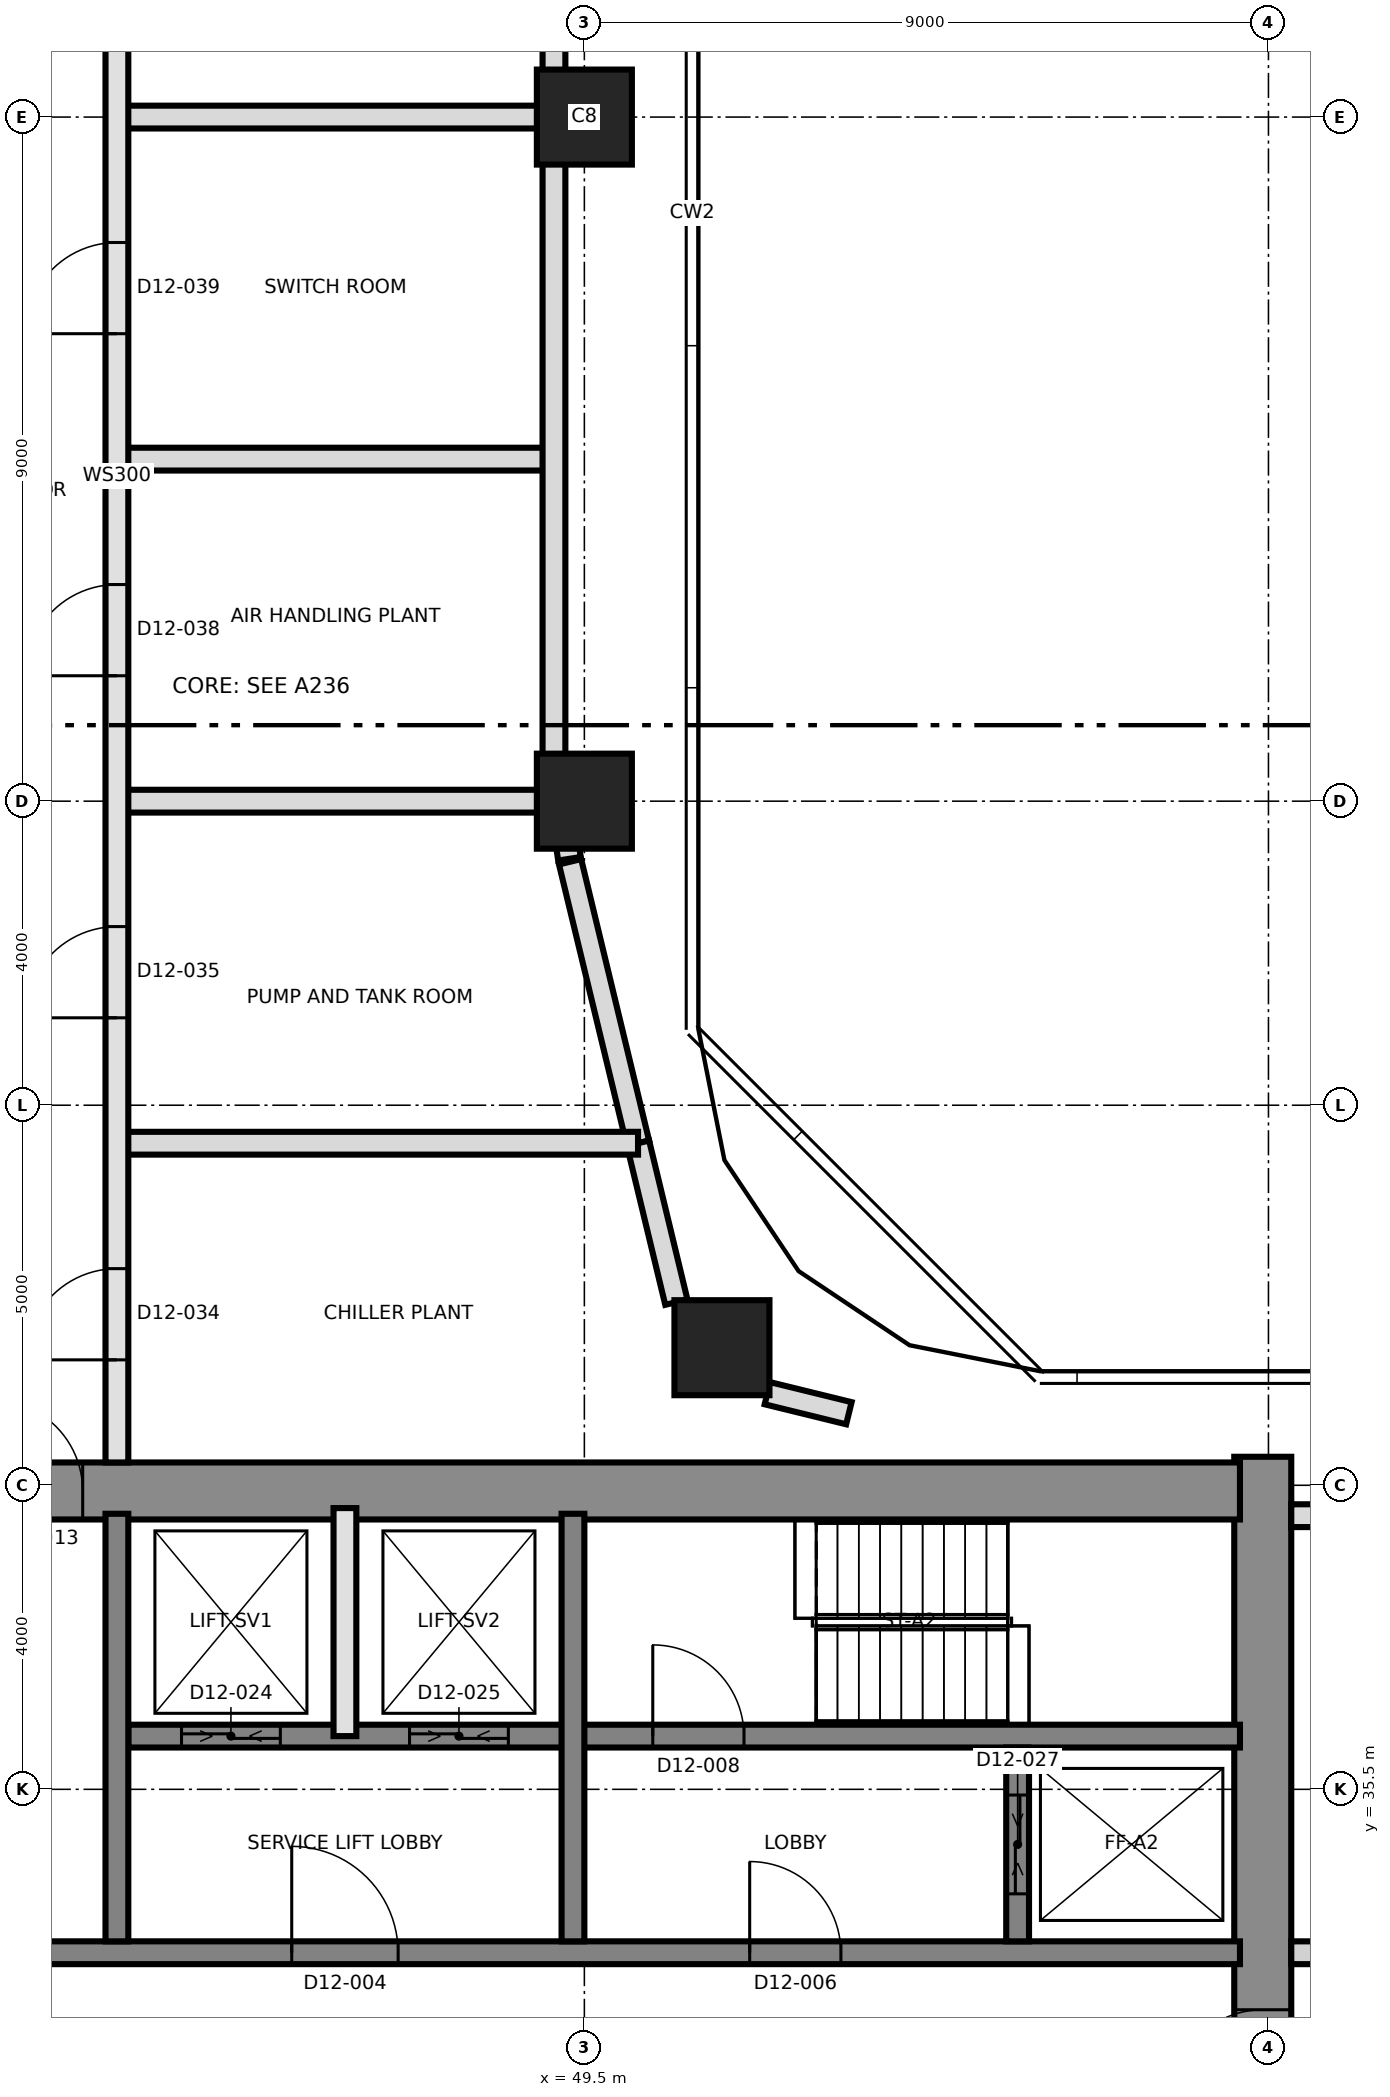
"""IFC4 building model, lengths in metres.
Left out: names, types, materials, properties, quantities, classifications, styles, units other than length and angle.
Written with IfcOpenShell. Run it as: python <this file> out.ifc"""

import sys

from ifc_helpers import new_model, si_unit, direction, frame, frame_2d, origin, origin_2d, place, context, subcontext, project, spatial, rectangle, extrude, element, fill, save


model = new_model("IFC4")
c1 = context("Model", 3, precision=1e-05, world=origin(), true_north=direction((0.0, 1.0)))
c2 = subcontext(c1, "Body", "Model", "MODEL_VIEW")
j1 = project(units=[si_unit("LENGTHUNIT", "METRE"), si_unit("PLANEANGLEUNIT", "RADIAN")], contexts=[c1])
p1 = place(None, origin())
s1 = spatial("IfcSite", under=j1, at=p1, CompositionType="ELEMENT")
p2 = place(p1, origin())
s2 = spatial("IfcBuilding", under=s1, at=p2, CompositionType="ELEMENT")
p3 = place(p2, frame((0.0, 0.0, 135.2)))
s3 = spatial("IfcBuildingStorey", under=s2, at=p3, CompositionType="ELEMENT", Elevation=135.2)
p4 = place(p3, frame((58.425, 21.125, 0.0), z_axis=(0.0, 0.0, 1.0), x_axis=(0.0, 1.0, 0.0)))
e1 = element("IfcWall", 1, at=p4, inside=s3, PredefinedType="SHEAR", context=c2, shape_type="SweptSolid", body=[
    extrude(rectangle(XDim=18.75, YDim=0.75, at=frame_2d((9.375, 0.0))), origin(), (0.0, 0.0, 1.0), 7.0),
])
p5 = place(p4, frame((10.275, 0.0, 0.0)))
e2 = element("IfcOpeningElement", 2, at=p5, cuts=e1, PredefinedType="OPENING", context=c2, shape_type="SweptSolid", body=[
    extrude(rectangle(XDim=1.2, YDim=2.1, at=frame_2d((0.6, 1.05))), frame((0.0, 0.385, 0.0), z_axis=(0.0, -1.0, 0.0), x_axis=(1.0, 0.0, 0.0)), (0.0, 0.0, 1.0), 0.77),
])
p6 = place(p3, frame((31.125, 39.425, 0.0), z_axis=(0.0, 0.0, 1.0), x_axis=(1.0, 0.0, 0.0)))
e3 = element("IfcWall", 3, at=p6, inside=s3, PredefinedType="SHEAR", context=c2, shape_type="SweptSolid", body=[
    extrude(rectangle(XDim=27.0, YDim=0.75, at=frame_2d((13.5, 0.0))), origin(), (0.0, 0.0, 1.0), 7.0),
])
p7 = place(p6, frame((10.575, 0.0, 0.0)))
e4 = element("IfcOpeningElement", 4, at=p7, cuts=e3, PredefinedType="OPENING", context=c2, shape_type="SweptSolid", body=[
    extrude(rectangle(XDim=1.2, YDim=2.1, at=frame_2d((0.6, 1.05))), frame((0.0, 0.385, 0.0), z_axis=(0.0, -1.0, 0.0), x_axis=(1.0, 0.0, 0.0)), (0.0, 0.0, 1.0), 0.77),
])
p8 = place(p3, frame((31.875, 33.35, 0.0), z_axis=(0.0, 0.0, 1.0), x_axis=(1.0, 0.0, 0.0)))
e5 = element("IfcWall", 5, at=p8, inside=s3, PredefinedType="SHEAR", context=c2, shape_type="SweptSolid", body=[
    extrude(rectangle(XDim=26.25, YDim=0.3, at=frame_2d((13.125, 0.0))), origin(), (0.0, 0.0, 1.0), 7.0),
])
p9 = place(p8, frame((13.775, 0.0, 0.0)))
e6 = element("IfcOpeningElement", 6, at=p9, cuts=e5, PredefinedType="OPENING", context=c2, shape_type="SweptSolid", body=[
    extrude(rectangle(XDim=1.4, YDim=2.1, at=frame_2d((0.7, 1.05))), frame((0.0, 0.16, 0.0), z_axis=(0.0, -1.0, 0.0), x_axis=(1.0, 0.0, 0.0)), (0.0, 0.0, 1.0), 0.32),
])
p10 = place(p8, frame((5.25, 0.0, 0.0)))
e7 = element("IfcOpeningElement", 7, at=p10, cuts=e5, PredefinedType="OPENING", context=c2, shape_type="SweptSolid", body=[
    extrude(rectangle(XDim=1.2, YDim=2.1, at=frame_2d((0.6, 1.05))), frame((0.0, 0.16, 0.0), z_axis=(0.0, -1.0, 0.0), x_axis=(1.0, 0.0, 0.0)), (0.0, 0.0, 1.0), 0.32),
])
p11 = place(p8, frame((19.8, 0.0, 0.0)))
e8 = element("IfcOpeningElement", 8, at=p11, cuts=e5, PredefinedType="OPENING", context=c2, shape_type="SweptSolid", body=[
    extrude(rectangle(XDim=1.2, YDim=2.1, at=frame_2d((0.6, 1.05))), frame((0.0, 0.16, 0.0), z_axis=(0.0, -1.0, 0.0), x_axis=(1.0, 0.0, 0.0)), (0.0, 0.0, 1.0), 0.32),
])
p12 = place(p3, frame((43.5, 36.2, 0.0), z_axis=(0.0, 0.0, 1.0), x_axis=(1.0, 0.0, 0.0)))
e9 = element("IfcWall", 9, at=p12, inside=s3, PredefinedType="SHEAR", context=c2, shape_type="SweptSolid", body=[
    extrude(rectangle(XDim=14.625, YDim=0.3, at=frame_2d((7.312, 0.0))), origin(), (0.0, 0.0, 1.0), 7.0),
])
p13 = place(p12, frame((6.9, 0.0, 0.0)))
e10 = element("IfcOpeningElement", 10, at=p13, cuts=e9, PredefinedType="OPENING", context=c2, shape_type="SweptSolid", body=[
    extrude(rectangle(XDim=1.2, YDim=2.1, at=frame_2d((0.6, 1.05))), frame((0.0, 0.16, 0.0), z_axis=(0.0, -1.0, 0.0), x_axis=(1.0, 0.0, 0.0)), (0.0, 0.0, 1.0), 0.32),
])
p14 = place(p12, frame((0.7, 0.0, 0.0)))
e11 = element("IfcOpeningElement", 11, at=p14, cuts=e9, PredefinedType="OPENING", context=c2, shape_type="SweptSolid", body=[
    extrude(rectangle(XDim=1.3, YDim=2.4, at=frame_2d((0.65, 1.2))), frame((0.0, 0.16, 0.0), z_axis=(0.0, -1.0, 0.0), x_axis=(1.0, 0.0, 0.0)), (0.0, 0.0, 1.0), 0.32),
])
p15 = place(p12, frame((3.7, 0.0, 0.0)))
e12 = element("IfcOpeningElement", 12, at=p15, cuts=e9, PredefinedType="OPENING", context=c2, shape_type="SweptSolid", body=[
    extrude(rectangle(XDim=1.3, YDim=2.4, at=frame_2d((0.65, 1.2))), frame((0.0, 0.16, 0.0), z_axis=(0.0, -1.0, 0.0), x_axis=(1.0, 0.0, 0.0)), (0.0, 0.0, 1.0), 0.32),
])
for number, where, z_axis, x_axis in (
    (13, (43.35, 33.5, 0.0), (0.0, 0.0, 1.0), (0.0, 1.0, 0.0)),
    (14, (49.35, 33.5, 0.0), (0.0, 0.0, 1.0), (0.0, 1.0, 0.0)),
):
    element("IfcWall", number, at=place(p3, frame(where, z_axis=z_axis, x_axis=x_axis)), inside=s3, PredefinedType="SHEAR", context=c2, shape_type="SweptSolid", body=[
        extrude(rectangle(XDim=5.625, YDim=0.3, at=frame_2d((2.812, 0.0))), origin(), (0.0, 0.0, 1.0), 7.0),
    ])
p16 = place(p3, frame((55.2, 33.5, 0.0), z_axis=(0.0, 0.0, 1.0), x_axis=(0.0, 1.0, 0.0)))
e15 = element("IfcWall", 15, at=p16, inside=s3, PredefinedType="SHEAR", context=c2, shape_type="SweptSolid", body=[
    extrude(rectangle(XDim=2.55, YDim=0.3, at=frame_2d((1.275, 0.0))), origin(), (0.0, 0.0, 1.0), 7.0),
])
p17 = place(p16, frame((0.625, 0.0, 0.0)))
e16 = element("IfcOpeningElement", 16, at=p17, cuts=e15, PredefinedType="OPENING", context=c2, shape_type="SweptSolid", body=[
    extrude(rectangle(XDim=1.3, YDim=2.4, at=frame_2d((0.65, 1.2))), frame((0.0, 0.16, 0.0), z_axis=(0.0, -1.0, 0.0), x_axis=(1.0, 0.0, 0.0)), (0.0, 0.0, 1.0), 0.32),
])
for number, where, z_axis, x_axis in (
    (17, (51.31, 41.31, 0.0), (0.0, 0.0, 1.0), (1.0, 0.0, 0.0)),
    (18, (49.5, 48.5, 0.0), (0.0, 0.0, 1.0), (1.0, 0.0, 0.0)),
    (19, (49.5, 57.5, 0.0), (0.0, 0.0, 1.0), (1.0, 0.0, 0.0)),
):
    element("IfcColumn", number, at=place(p3, frame(where, z_axis=z_axis, x_axis=x_axis)), inside=s3, PredefinedType="COLUMN", context=c2, shape_type="SweptSolid", body=[
        extrude(rectangle(XDim=1.25, YDim=1.25, at=origin_2d()), origin(), (0.0, 0.0, 1.0), 7.0),
    ])
p18 = place(p3, frame((46.35, 36.2, 0.0), z_axis=(0.0, 0.0, 1.0), x_axis=(0.0, 1.0, 0.0)))
e20 = element("IfcWall", 20, at=p18, inside=s3, PredefinedType="SOLIDWALL", context=c2, shape_type="SweptSolid", body=[
    extrude(rectangle(XDim=3.0, YDim=0.3, at=frame_2d((1.5, 0.0))), origin(), (0.0, 0.0, 1.0), 6.7),
])
p19 = place(p3, frame((49.1, 49.069, 0.0), z_axis=(0.0, 0.0, 1.0), x_axis=(0.152694606026, -0.988273422333, 0.0)))
e21 = element("IfcWall", 21, at=p19, inside=s3, PredefinedType="PARTITIONING", context=c2, shape_type="SweptSolid", body=[
    extrude(rectangle(XDim=0.403, YDim=0.3, at=frame_2d((0.201, 0.0))), origin(), (0.0, 0.0, 1.0), 6.7),
])
p20 = place(p3, frame((49.188, 48.5, 0.0), z_axis=(0.0, 0.0, 1.0), x_axis=(0.151219830962, -0.988500158181, 0.0)))
e22 = element("IfcWall", 22, at=p20, inside=s3, PredefinedType="PARTITIONING", context=c2, shape_type="SweptSolid", body=[
    extrude(rectangle(XDim=0.767, YDim=0.3, at=frame_2d((0.383, 0.0))), origin(), (0.0, 0.0, 1.0), 6.7),
])
p21 = place(p3, frame((49.312, 47.703, 0.0), z_axis=(0.0, 0.0, 1.0), x_axis=(0.234701095005, -0.972067588187, 0.0)))
e23 = element("IfcWall", 23, at=p21, inside=s3, PredefinedType="PARTITIONING", context=c2, shape_type="SweptSolid", body=[
    extrude(rectangle(XDim=3.809, YDim=0.3, at=frame_2d((1.905, 0.0))), origin(), (0.0, 0.0, 1.0), 6.7),
])
p22 = place(p3, frame((50.206, 44.0, 0.0), z_axis=(0.0, 0.0, 1.0), x_axis=(0.23427436711, -0.972170520493, 0.0)))
e24 = element("IfcWall", 24, at=p22, inside=s3, PredefinedType="PARTITIONING", context=c2, shape_type="SweptSolid", body=[
    extrude(rectangle(XDim=2.151, YDim=0.3, at=frame_2d((1.075, 0.0))), origin(), (0.0, 0.0, 1.0), 6.7),
])
p23 = place(p3, frame((50.82, 41.715, 0.0), z_axis=(0.0, 0.0, 1.0), x_axis=(0.707106781187, -0.707106781187, 0.0)))
e25 = element("IfcWall", 25, at=p23, inside=s3, PredefinedType="PARTITIONING", context=c2, shape_type="SweptSolid", body=[
    extrude(rectangle(XDim=1.266, YDim=0.3, at=frame_2d((0.633, 0.0))), origin(), (0.0, 0.0, 1.0), 6.7),
])
p24 = place(p3, frame((51.908, 40.711, 0.0), z_axis=(0.0, 0.0, 1.0), x_axis=(0.971212775143, -0.238213654937, 0.0)))
e26 = element("IfcWall", 26, at=p24, inside=s3, PredefinedType="PARTITIONING", context=c2, shape_type="SweptSolid", body=[
    extrude(rectangle(XDim=1.104, YDim=0.3, at=frame_2d((0.552, 0.0))), origin(), (0.0, 0.0, 1.0), 6.7),
])
p25 = place(p3, frame((58.8, 33.35, 0.0), z_axis=(0.0, 0.0, 1.0), x_axis=(1.0, 0.0, 0.0)))
e27 = element("IfcWall", 27, at=p25, inside=s3, PredefinedType="PARTITIONING", context=c2, shape_type="SweptSolid", body=[
    extrude(rectangle(XDim=26.53, YDim=0.3, at=frame_2d((13.265, 0.0))), origin(), (0.0, 0.0, 1.0), 6.7),
])
p26 = place(p25, frame((12.0, 0.0, 0.0)))
e28 = element("IfcOpeningElement", 28, at=p26, cuts=e27, PredefinedType="OPENING", context=c2, shape_type="SweptSolid", body=[
    extrude(rectangle(XDim=2.4, YDim=2.4, at=frame_2d((1.2, 1.2))), frame((0.0, 0.16, 0.0), z_axis=(0.0, -1.0, 0.0), x_axis=(1.0, 0.0, 0.0)), (0.0, 0.0, 1.0), 0.32),
])
p27 = place(p3, frame((58.8, 39.1, 0.0), z_axis=(0.0, 0.0, 1.0), x_axis=(1.0, 0.0, 0.0)))
e29 = element("IfcWall", 29, at=p27, inside=s3, PredefinedType="PARTITIONING", context=c2, shape_type="SweptSolid", body=[
    extrude(rectangle(XDim=26.53, YDim=0.3, at=frame_2d((13.265, 0.0))), origin(), (0.0, 0.0, 1.0), 6.7),
])
p28 = place(p3, frame((43.35, 44.0, 0.0), z_axis=(0.0, 0.0, 1.0), x_axis=(1.0, 0.0, 0.0)))
e30 = element("IfcWall", 30, at=p28, inside=s3, PredefinedType="PARTITIONING", context=c2, shape_type="SweptSolid", body=[
    extrude(rectangle(XDim=6.856, YDim=0.3, at=frame_2d((3.428, 0.0))), origin(), (0.0, 0.0, 1.0), 6.7),
])
p29 = place(p3, frame((43.35, 48.5, 0.0), z_axis=(0.0, 0.0, 1.0), x_axis=(1.0, 0.0, 0.0)))
e31 = element("IfcWall", 31, at=p29, inside=s3, PredefinedType="PARTITIONING", context=c2, shape_type="SweptSolid", body=[
    extrude(rectangle(XDim=5.838, YDim=0.3, at=frame_2d((2.919, 0.0))), origin(), (0.0, 0.0, 1.0), 6.7),
])
for number, where, z_axis, x_axis in (
    (32, (43.35, 53.0, 0.0), (0.0, 0.0, 1.0), (1.0, 0.0, 0.0)),
    (33, (43.35, 57.5, 0.0), (0.0, 0.0, 1.0), (1.0, 0.0, 0.0)),
):
    element("IfcWall", number, at=place(p3, frame(where, z_axis=z_axis, x_axis=x_axis)), inside=s3, PredefinedType="PARTITIONING", context=c2, shape_type="SweptSolid", body=[
        extrude(rectangle(XDim=5.75, YDim=0.3, at=frame_2d((2.875, 0.0))), origin(), (0.0, 0.0, 1.0), 6.7),
    ])
p30 = place(p3, frame((43.35, 39.8, 0.0), z_axis=(0.0, 0.0, 1.0), x_axis=(0.0, 1.0, 0.0)))
e34 = element("IfcWall", 34, at=p30, inside=s3, PredefinedType="SOLIDWALL", context=c2, shape_type="SweptSolid", body=[
    extrude(rectangle(XDim=25.95, YDim=0.3, at=frame_2d((12.975, 0.0))), origin(), (0.0, 0.0, 1.0), 6.7),
])
p31 = place(p30, frame((1.35, 0.0, 0.0)))
e35 = element("IfcOpeningElement", 35, at=p31, cuts=e34, PredefinedType="OPENING", context=c2, shape_type="SweptSolid", body=[
    extrude(rectangle(XDim=1.2, YDim=2.1, at=frame_2d((0.6, 1.05))), frame((0.0, 0.16, 0.0), z_axis=(0.0, -1.0, 0.0), x_axis=(1.0, 0.0, 0.0)), (0.0, 0.0, 1.0), 0.32),
])
p32 = place(p30, frame((5.85, 0.0, 0.0)))
e36 = element("IfcOpeningElement", 36, at=p32, cuts=e34, PredefinedType="OPENING", context=c2, shape_type="SweptSolid", body=[
    extrude(rectangle(XDim=1.2, YDim=2.1, at=frame_2d((0.6, 1.05))), frame((0.0, 0.16, 0.0), z_axis=(0.0, -1.0, 0.0), x_axis=(1.0, 0.0, 0.0)), (0.0, 0.0, 1.0), 0.32),
])
p33 = place(p30, frame((10.35, 0.0, 0.0)))
e37 = element("IfcOpeningElement", 37, at=p33, cuts=e34, PredefinedType="OPENING", context=c2, shape_type="SweptSolid", body=[
    extrude(rectangle(XDim=1.2, YDim=2.1, at=frame_2d((0.6, 1.05))), frame((0.0, 0.16, 0.0), z_axis=(0.0, -1.0, 0.0), x_axis=(1.0, 0.0, 0.0)), (0.0, 0.0, 1.0), 0.32),
])
p34 = place(p30, frame((14.85, 0.0, 0.0)))
e38 = element("IfcOpeningElement", 38, at=p34, cuts=e34, PredefinedType="OPENING", context=c2, shape_type="SweptSolid", body=[
    extrude(rectangle(XDim=1.2, YDim=2.1, at=frame_2d((0.6, 1.05))), frame((0.0, 0.16, 0.0), z_axis=(0.0, -1.0, 0.0), x_axis=(1.0, 0.0, 0.0)), (0.0, 0.0, 1.0), 0.32),
])
p35 = place(p30, frame((20.975, 0.0, 0.0)))
e39 = element("IfcOpeningElement", 39, at=p35, cuts=e34, PredefinedType="OPENING", context=c2, shape_type="SweptSolid", body=[
    extrude(rectangle(XDim=1.4, YDim=2.1, at=frame_2d((0.7, 1.05))), frame((0.0, 0.16, 0.0), z_axis=(0.0, -1.0, 0.0), x_axis=(1.0, 0.0, 0.0)), (0.0, 0.0, 1.0), 0.32),
])
p36 = place(p3, frame((49.1, 49.069, 0.0), z_axis=(0.0, 0.0, 1.0), x_axis=(0.0, 1.0, 0.0)))
e40 = element("IfcWall", 40, at=p36, inside=s3, PredefinedType="PARTITIONING", context=c2, shape_type="SweptSolid", body=[
    extrude(rectangle(XDim=16.381, YDim=0.3, at=frame_2d((8.19, 0.0))), origin(), (0.0, 0.0, 1.0), 6.7),
])
p37 = place(p9, origin())
e41 = element("IfcDoor", 41, at=p37, inside=s3, OperationType="SINGLE_SWING_RIGHT", PredefinedType="DOOR", context=c2, shape_type="SweptSolid", body=[
    extrude(rectangle(XDim=1.4, YDim=2.1, at=frame_2d((0.7, 1.05))), frame((0.0, 0.025, 0.0), z_axis=(0.0, -1.0, 0.0), x_axis=(1.0, 0.0, 0.0)), (0.0, 0.0, 1.0), 0.05),
])
fill(e6, e41)
p38 = place(p11, origin())
e42 = element("IfcDoor", 42, at=p38, inside=s3, OperationType="SINGLE_SWING_RIGHT", PredefinedType="DOOR", context=c2, shape_type="SweptSolid", body=[
    extrude(rectangle(XDim=1.2, YDim=2.1, at=frame_2d((0.6, 1.05))), frame((0.0, 0.025, 0.0), z_axis=(0.0, -1.0, 0.0), x_axis=(1.0, 0.0, 0.0)), (0.0, 0.0, 1.0), 0.05),
])
fill(e8, e42)
p39 = place(p13, origin())
e43 = element("IfcDoor", 43, at=p39, inside=s3, OperationType="SINGLE_SWING_LEFT", PredefinedType="DOOR", context=c2, shape_type="SweptSolid", body=[
    extrude(rectangle(XDim=1.2, YDim=2.1, at=frame_2d((0.6, 1.05))), frame((0.0, 0.025, 0.0), z_axis=(0.0, -1.0, 0.0), x_axis=(1.0, 0.0, 0.0)), (0.0, 0.0, 1.0), 0.05),
])
fill(e10, e43)
p40 = place(p5, origin())
e44 = element("IfcDoor", 44, at=p40, inside=s3, OperationType="SINGLE_SWING_LEFT", PredefinedType="DOOR", context=c2, shape_type="SweptSolid", body=[
    extrude(rectangle(XDim=1.2, YDim=2.1, at=frame_2d((0.6, 1.05))), frame((0.0, 0.025, 0.0), z_axis=(0.0, -1.0, 0.0), x_axis=(1.0, 0.0, 0.0)), (0.0, 0.0, 1.0), 0.05),
])
fill(e2, e44)
p41 = place(p7, origin())
e45 = element("IfcDoor", 45, at=p41, inside=s3, OperationType="SINGLE_SWING_RIGHT", PredefinedType="DOOR", context=c2, shape_type="SweptSolid", body=[
    extrude(rectangle(XDim=1.2, YDim=2.1, at=frame_2d((0.6, 1.05))), frame((0.0, 0.025, 0.0), z_axis=(0.0, -1.0, 0.0), x_axis=(1.0, 0.0, 0.0)), (0.0, 0.0, 1.0), 0.05),
])
fill(e4, e45)
p42 = place(p14, origin())
e46 = element("IfcDoor", 46, at=p42, inside=s3, OperationType="SLIDING_TO_LEFT", PredefinedType="DOOR", context=c2, shape_type="SweptSolid", body=[
    extrude(rectangle(XDim=1.3, YDim=2.4, at=frame_2d((0.65, 1.2))), frame((0.0, 0.025, 0.0), z_axis=(0.0, -1.0, 0.0), x_axis=(1.0, 0.0, 0.0)), (0.0, 0.0, 1.0), 0.05),
])
fill(e11, e46)
p43 = place(p15, origin())
e47 = element("IfcDoor", 47, at=p43, inside=s3, OperationType="SLIDING_TO_LEFT", PredefinedType="DOOR", context=c2, shape_type="SweptSolid", body=[
    extrude(rectangle(XDim=1.3, YDim=2.4, at=frame_2d((0.65, 1.2))), frame((0.0, 0.025, 0.0), z_axis=(0.0, -1.0, 0.0), x_axis=(1.0, 0.0, 0.0)), (0.0, 0.0, 1.0), 0.05),
])
fill(e12, e47)
p44 = place(p17, origin())
e48 = element("IfcDoor", 48, at=p44, inside=s3, OperationType="SLIDING_TO_LEFT", PredefinedType="DOOR", context=c2, shape_type="SweptSolid", body=[
    extrude(rectangle(XDim=1.3, YDim=2.4, at=frame_2d((0.65, 1.2))), frame((0.0, 0.025, 0.0), z_axis=(0.0, -1.0, 0.0), x_axis=(1.0, 0.0, 0.0)), (0.0, 0.0, 1.0), 0.05),
])
fill(e16, e48)
p45 = place(p31, origin())
e49 = element("IfcDoor", 49, at=p45, inside=s3, OperationType="SINGLE_SWING_LEFT", PredefinedType="DOOR", context=c2, shape_type="SweptSolid", body=[
    extrude(rectangle(XDim=1.2, YDim=2.1, at=frame_2d((0.6, 1.05))), frame((0.0, 0.025, 0.0), z_axis=(0.0, -1.0, 0.0), x_axis=(1.0, 0.0, 0.0)), (0.0, 0.0, 1.0), 0.05),
])
fill(e35, e49)
p46 = place(p32, origin())
e50 = element("IfcDoor", 50, at=p46, inside=s3, OperationType="SINGLE_SWING_LEFT", PredefinedType="DOOR", context=c2, shape_type="SweptSolid", body=[
    extrude(rectangle(XDim=1.2, YDim=2.1, at=frame_2d((0.6, 1.05))), frame((0.0, 0.025, 0.0), z_axis=(0.0, -1.0, 0.0), x_axis=(1.0, 0.0, 0.0)), (0.0, 0.0, 1.0), 0.05),
])
fill(e36, e50)
p47 = place(p33, origin())
e51 = element("IfcDoor", 51, at=p47, inside=s3, OperationType="SINGLE_SWING_LEFT", PredefinedType="DOOR", context=c2, shape_type="SweptSolid", body=[
    extrude(rectangle(XDim=1.2, YDim=2.1, at=frame_2d((0.6, 1.05))), frame((0.0, 0.025, 0.0), z_axis=(0.0, -1.0, 0.0), x_axis=(1.0, 0.0, 0.0)), (0.0, 0.0, 1.0), 0.05),
])
fill(e37, e51)
p48 = place(p34, origin())
e52 = element("IfcDoor", 52, at=p48, inside=s3, OperationType="SINGLE_SWING_RIGHT", PredefinedType="DOOR", context=c2, shape_type="SweptSolid", body=[
    extrude(rectangle(XDim=1.2, YDim=2.1, at=frame_2d((0.6, 1.05))), frame((0.0, 0.025, 0.0), z_axis=(0.0, -1.0, 0.0), x_axis=(1.0, 0.0, 0.0)), (0.0, 0.0, 1.0), 0.05),
])
fill(e38, e52)
save(model, sys.argv[1])
